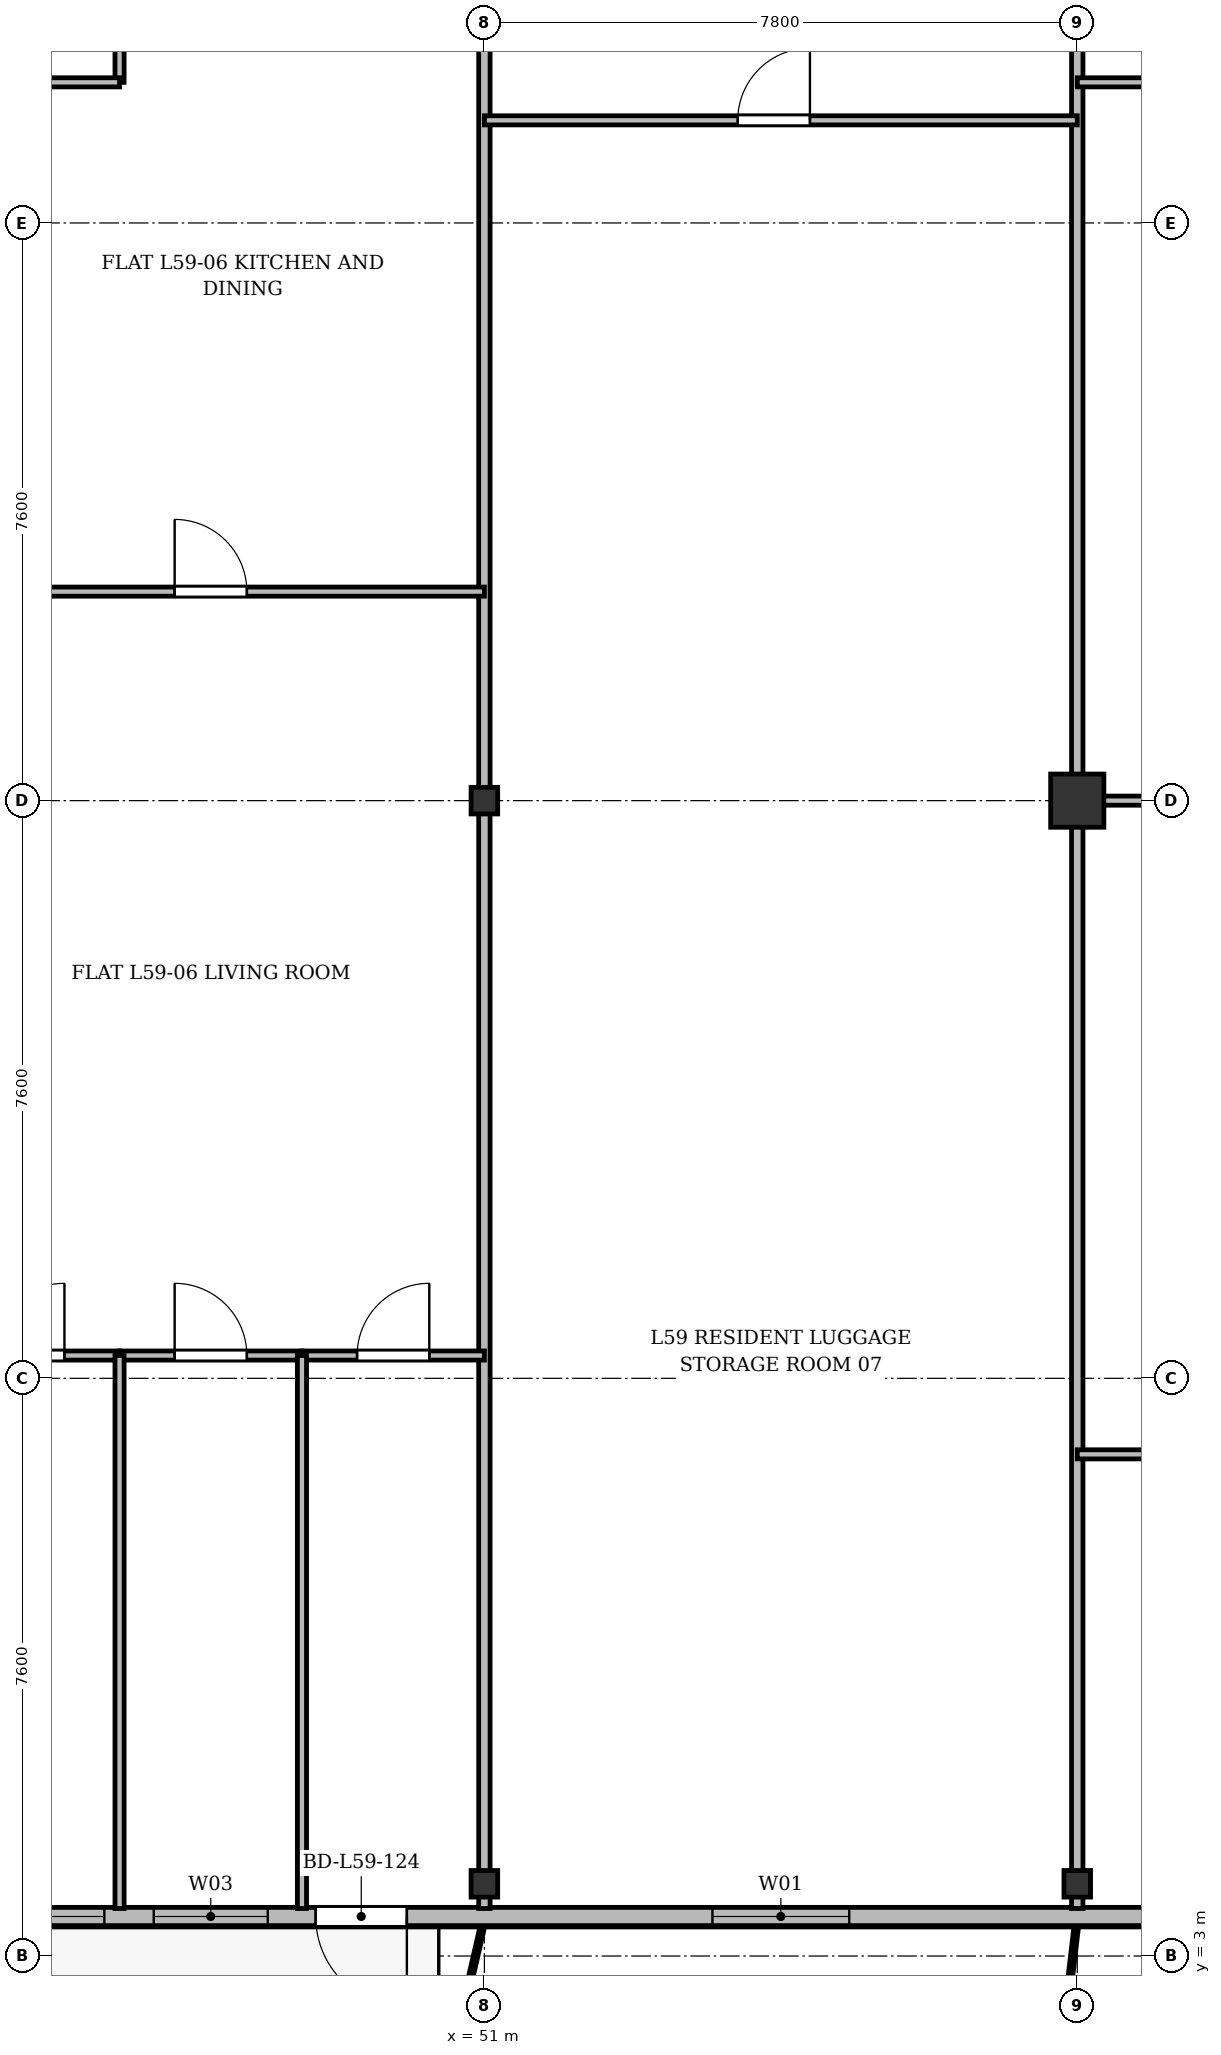
"""IFC4 building model, lengths in metres.
Left out: names, types, materials, properties, quantities, classifications, styles, units other than length and angle.
Written with IfcOpenShell. Run it as: python <this file> out.ifc"""

import sys

from ifc_helpers import new_model, si_unit, direction, frame, frame_2d, origin, origin_2d, place, context, subcontext, project, spatial, rectangle, i_section, extrude, source, transform, mapped, element, fill, save


model = new_model("IFC4")
c1 = context("Model", 3, precision=1e-05, world=origin(), true_north=direction((0.0, 1.0)))
c2 = subcontext(c1, "Body", "Model", "MODEL_VIEW")
j1 = project(units=[si_unit("LENGTHUNIT", "METRE"), si_unit("PLANEANGLEUNIT", "RADIAN")], contexts=[c1])
p1 = place(None, origin())
s1 = spatial("IfcSite", under=j1, at=p1, CompositionType="ELEMENT")
p2 = place(p1, origin())
s2 = spatial("IfcBuilding", under=s1, at=p2, CompositionType="ELEMENT")
p3 = place(p2, frame((0.0, 0.0, 226.5)))
s3 = spatial("IfcBuildingStorey", under=s2, at=p3, CompositionType="ELEMENT", Elevation=226.5)
m1 = source(origin(), c2, "Body", "SweptSolid", [
    extrude(i_section(OverallWidth=0.35, OverallDepth=0.35, WebThickness=0.018, FlangeThickness=0.028, at=origin_2d()), origin(), (0.0, 0.0, 1.0), 3.6),
])
for number, where, z_axis, x_axis in (
    (1, (51.0, 3.95, 0.0), (0.0, 0.0, 1.0), (1.0, 0.0, 0.0)),
    (2, (51.0, 18.2, 0.0), (0.0, 0.0, 1.0), (1.0, 0.0, 0.0)),
    (3, (58.8, 3.95, 0.0), (0.0, 0.0, 1.0), (1.0, 0.0, 0.0)),
):
    element("IfcColumn", number, at=place(p3, frame(where, z_axis=z_axis, x_axis=x_axis)), inside=s3, PredefinedType="COLUMN", context=c2, shape_type="MappedRepresentation", body=[
        mapped(m1, transform((0.0, 0.0, 0.0), x_axis=(1.0, 0.0, 0.0), y_axis=(0.0, 1.0, 0.0), z_axis=(0.0, 0.0, 1.0), scale=1.0)),
    ])
m2 = source(origin(), c2, "Body", "SweptSolid", [
    extrude(rectangle(XDim=0.7, YDim=0.7, at=origin_2d()), origin(), (0.0, 0.0, 1.0), 3.6),
])
p4 = place(p3, frame((58.8, 18.2, 0.0), z_axis=(0.0, 0.0, 1.0), x_axis=(1.0, 0.0, 0.0)))
e4 = element("IfcColumn", 4, at=p4, inside=s3, PredefinedType="COLUMN", context=c2, shape_type="MappedRepresentation", body=[
    mapped(m2, transform((0.0, 0.0, 0.0), x_axis=(1.0, 0.0, 0.0), y_axis=(0.0, 1.0, 0.0), z_axis=(0.0, 0.0, 1.0), scale=1.0)),
])
p5 = place(p3, frame((63.4, 3.52, 0.0), z_axis=(0.0, 0.0, 1.0), x_axis=(-1.0, 0.0, 0.0)))
e5 = element("IfcWall", 5, at=p5, inside=s3, PredefinedType="SOLIDWALL", context=c2, shape_type="SweptSolid", body=[
    extrude(rectangle(XDim=52.4, YDim=0.24, at=frame_2d((26.2, 0.0))), origin(), (0.0, 0.0, 1.0), 3.36),
])
p6 = place(p5, frame((1.52, 0.0, 0.9)))
e6 = element("IfcOpeningElement", 6, at=p6, cuts=e5, PredefinedType="OPENING", context=c2, shape_type="SweptSolid", body=[
    extrude(rectangle(XDim=1.65, YDim=1.85, at=frame_2d((0.825, 0.925))), frame((0.0, 0.13, 0.0), z_axis=(0.0, -1.0, 0.0), x_axis=(1.0, 0.0, 0.0)), (0.0, 0.0, 1.0), 0.26),
])
p7 = place(p5, frame((7.6, 0.0, 0.9)))
e7 = element("IfcOpeningElement", 7, at=p7, cuts=e5, PredefinedType="OPENING", context=c2, shape_type="SweptSolid", body=[
    extrude(rectangle(XDim=1.8, YDim=1.8, at=frame_2d((0.9, 0.9))), frame((0.0, 0.13, 0.0), z_axis=(0.0, -1.0, 0.0), x_axis=(1.0, 0.0, 0.0)), (0.0, 0.0, 1.0), 0.26),
])
p8 = place(p5, frame((13.42, 0.0, 0.0)))
e8 = element("IfcOpeningElement", 8, at=p8, cuts=e5, PredefinedType="OPENING", context=c2, shape_type="SweptSolid", body=[
    extrude(rectangle(XDim=1.2, YDim=2.2, at=frame_2d((0.6, 1.1))), frame((0.0, 0.13, 0.0), z_axis=(0.0, -1.0, 0.0), x_axis=(1.0, 0.0, 0.0)), (0.0, 0.0, 1.0), 0.26),
])
p9 = place(p5, frame((15.25, 0.0, 0.9)))
e9 = element("IfcOpeningElement", 9, at=p9, cuts=e5, PredefinedType="OPENING", context=c2, shape_type="SweptSolid", body=[
    extrude(rectangle(XDim=1.5, YDim=1.75, at=frame_2d((0.75, 0.875))), frame((0.0, 0.13, 0.0), z_axis=(0.0, -1.0, 0.0), x_axis=(1.0, 0.0, 0.0)), (0.0, 0.0, 1.0), 0.26),
])
p10 = place(p5, frame((17.4, 0.0, 0.9)))
e10 = element("IfcOpeningElement", 10, at=p10, cuts=e5, PredefinedType="OPENING", context=c2, shape_type="SweptSolid", body=[
    extrude(rectangle(XDim=2.0, YDim=1.95, at=frame_2d((1.0, 0.975))), frame((0.0, 0.13, 0.0), z_axis=(0.0, -1.0, 0.0), x_axis=(1.0, 0.0, 0.0)), (0.0, 0.0, 1.0), 0.26),
])
p11 = place(p5, frame((20.425, 0.0, 0.9)))
e11 = element("IfcOpeningElement", 11, at=p11, cuts=e5, PredefinedType="OPENING", context=c2, shape_type="SweptSolid", body=[
    extrude(rectangle(XDim=1.65, YDim=1.85, at=frame_2d((0.825, 0.925))), frame((0.0, 0.13, 0.0), z_axis=(0.0, -1.0, 0.0), x_axis=(1.0, 0.0, 0.0)), (0.0, 0.0, 1.0), 0.26),
])
p12 = place(p5, frame((23.65, 0.0, 0.9)))
e12 = element("IfcOpeningElement", 12, at=p12, cuts=e5, PredefinedType="OPENING", context=c2, shape_type="SweptSolid", body=[
    extrude(rectangle(XDim=1.8, YDim=1.8, at=frame_2d((0.9, 0.9))), frame((0.0, 0.13, 0.0), z_axis=(0.0, -1.0, 0.0), x_axis=(1.0, 0.0, 0.0)), (0.0, 0.0, 1.0), 0.26),
])
p13 = place(p5, frame((28.4, 0.0, 0.9)))
e13 = element("IfcOpeningElement", 13, at=p13, cuts=e5, PredefinedType="OPENING", context=c2, shape_type="SweptSolid", body=[
    extrude(rectangle(XDim=2.2, YDim=1.8, at=frame_2d((1.1, 0.9))), frame((0.0, 0.13, 0.0), z_axis=(0.0, -1.0, 0.0), x_axis=(1.0, 0.0, 0.0)), (0.0, 0.0, 1.0), 0.26),
])
p14 = place(p5, frame((33.85, 0.0, 0.9)))
e14 = element("IfcOpeningElement", 14, at=p14, cuts=e5, PredefinedType="OPENING", context=c2, shape_type="SweptSolid", body=[
    extrude(rectangle(XDim=1.5, YDim=1.75, at=frame_2d((0.75, 0.875))), frame((0.0, 0.13, 0.0), z_axis=(0.0, -1.0, 0.0), x_axis=(1.0, 0.0, 0.0)), (0.0, 0.0, 1.0), 0.26),
])
p15 = place(p5, frame((37.2, 0.0, 0.9)))
e15 = element("IfcOpeningElement", 15, at=p15, cuts=e5, PredefinedType="OPENING", context=c2, shape_type="SweptSolid", body=[
    extrude(rectangle(XDim=2.0, YDim=1.95, at=frame_2d((1.0, 0.975))), frame((0.0, 0.13, 0.0), z_axis=(0.0, -1.0, 0.0), x_axis=(1.0, 0.0, 0.0)), (0.0, 0.0, 1.0), 0.26),
])
p16 = place(p5, frame((41.09, 0.0, 0.0)))
e16 = element("IfcOpeningElement", 16, at=p16, cuts=e5, PredefinedType="OPENING", context=c2, shape_type="SweptSolid", body=[
    extrude(rectangle(XDim=1.2, YDim=2.2, at=frame_2d((0.6, 1.1))), frame((0.0, 0.13, 0.0), z_axis=(0.0, -1.0, 0.0), x_axis=(1.0, 0.0, 0.0)), (0.0, 0.0, 1.0), 0.26),
])
p17 = place(p5, frame((43.0, 0.0, 0.9)))
e17 = element("IfcOpeningElement", 17, at=p17, cuts=e5, PredefinedType="OPENING", context=c2, shape_type="SweptSolid", body=[
    extrude(rectangle(XDim=1.8, YDim=1.8, at=frame_2d((0.9, 0.9))), frame((0.0, 0.13, 0.0), z_axis=(0.0, -1.0, 0.0), x_axis=(1.0, 0.0, 0.0)), (0.0, 0.0, 1.0), 0.26),
])
p18 = place(p5, frame((45.75, 0.0, 0.9)))
e18 = element("IfcOpeningElement", 18, at=p18, cuts=e5, PredefinedType="OPENING", context=c2, shape_type="SweptSolid", body=[
    extrude(rectangle(XDim=1.5, YDim=1.75, at=frame_2d((0.75, 0.875))), frame((0.0, 0.13, 0.0), z_axis=(0.0, -1.0, 0.0), x_axis=(1.0, 0.0, 0.0)), (0.0, 0.0, 1.0), 0.26),
])
p19 = place(p5, frame((49.305, 0.0, 0.9)))
e19 = element("IfcOpeningElement", 19, at=p19, cuts=e5, PredefinedType="OPENING", context=c2, shape_type="SweptSolid", body=[
    extrude(rectangle(XDim=1.5, YDim=1.75, at=frame_2d((0.75, 0.875))), frame((0.0, 0.13, 0.0), z_axis=(0.0, -1.0, 0.0), x_axis=(1.0, 0.0, 0.0)), (0.0, 0.0, 1.0), 0.26),
])
for number, where, z_axis, x_axis in (
    (20, (51.0, 3.625, 0.0), (0.0, 0.0, 1.0), (0.0, 1.0, 0.0)),
    (21, (58.8, 3.625, 0.0), (0.0, 0.0, 1.0), (0.0, 1.0, 0.0)),
):
    element("IfcWall", number, at=place(p3, frame(where, z_axis=z_axis, x_axis=x_axis)), inside=s3, PredefinedType="PARTITIONING", context=c2, shape_type="SweptSolid", body=[
        extrude(rectangle(XDim=27.375, YDim=0.15, at=frame_2d((13.688, 0.0))), origin(), (0.0, 0.0, 1.0), 2.86),
    ])
p20 = place(p3, frame((43.8, 20.95, 0.0), z_axis=(0.0, 0.0, 1.0), x_axis=(1.0, 0.0, 0.0)))
e22 = element("IfcWall", 22, at=p20, inside=s3, PredefinedType="PARTITIONING", context=c2, shape_type="SweptSolid", body=[
    extrude(rectangle(XDim=7.2, YDim=0.12, at=frame_2d((3.6, 0.0))), origin(), (0.0, 0.0, 1.0), 2.86),
])
p21 = place(p20, frame((3.125, 0.0, 0.0)))
e23 = element("IfcOpeningElement", 23, at=p21, cuts=e22, PredefinedType="OPENING", context=c2, shape_type="SweptSolid", body=[
    extrude(rectangle(XDim=0.95, YDim=2.15, at=frame_2d((0.475, 1.075))), frame((0.0, 0.07, 0.0), z_axis=(0.0, -1.0, 0.0), x_axis=(1.0, 0.0, 0.0)), (0.0, 0.0, 1.0), 0.14),
])
p22 = place(p3, frame((46.2, 27.65, 0.0), z_axis=(0.0, 0.0, 1.0), x_axis=(0.0, 1.0, 0.0)))
e24 = element("IfcWall", 24, at=p22, inside=s3, PredefinedType="PARTITIONING", context=c2, shape_type="SweptSolid", body=[
    extrude(rectangle(XDim=3.35, YDim=0.12, at=frame_2d((1.675, 0.0))), origin(), (0.0, 0.0, 1.0), 3.36),
])
p23 = place(p22, frame((0.8, 0.0, 0.0)))
e25 = element("IfcOpeningElement", 25, at=p23, cuts=e24, PredefinedType="OPENING", context=c2, shape_type="SweptSolid", body=[
    extrude(rectangle(XDim=0.85, YDim=2.1, at=frame_2d((0.425, 1.05))), frame((0.0, 0.07, 0.0), z_axis=(0.0, -1.0, 0.0), x_axis=(1.0, 0.0, 0.0)), (0.0, 0.0, 1.0), 0.14),
])
p24 = place(p3, frame((43.8, 27.65, 0.0), z_axis=(0.0, 0.0, 1.0), x_axis=(1.0, 0.0, 0.0)))
e26 = element("IfcWall", 26, at=p24, inside=s3, PredefinedType="PARTITIONING", context=c2, shape_type="SweptSolid", body=[
    extrude(rectangle(XDim=2.4, YDim=0.12, at=frame_2d((1.2, 0.0))), origin(), (0.0, 0.0, 1.0), 2.86),
])
p25 = place(p3, frame((43.8, 10.9, 0.0), z_axis=(0.0, 0.0, 1.0), x_axis=(1.0, 0.0, 0.0)))
e27 = element("IfcWall", 27, at=p25, inside=s3, PredefinedType="PARTITIONING", context=c2, shape_type="SweptSolid", body=[
    extrude(rectangle(XDim=2.4, YDim=0.12, at=frame_2d((1.2, 0.0))), origin(), (0.0, 0.0, 1.0), 2.86),
])
p26 = place(p25, frame((0.725, 0.0, 0.0)))
e28 = element("IfcOpeningElement", 28, at=p26, cuts=e27, PredefinedType="OPENING", context=c2, shape_type="SweptSolid", body=[
    extrude(rectangle(XDim=0.95, YDim=2.15, at=frame_2d((0.475, 1.075))), frame((0.0, 0.07, 0.0), z_axis=(0.0, -1.0, 0.0), x_axis=(1.0, 0.0, 0.0)), (0.0, 0.0, 1.0), 0.14),
])
p27 = place(p3, frame((46.2, 10.9, 0.0), z_axis=(0.0, 0.0, 1.0), x_axis=(1.0, 0.0, 0.0)))
e29 = element("IfcWall", 29, at=p27, inside=s3, PredefinedType="PARTITIONING", context=c2, shape_type="SweptSolid", body=[
    extrude(rectangle(XDim=2.4, YDim=0.12, at=frame_2d((1.2, 0.0))), origin(), (0.0, 0.0, 1.0), 3.06),
])
p28 = place(p27, frame((0.725, 0.0, 0.0)))
e30 = element("IfcOpeningElement", 30, at=p28, cuts=e29, PredefinedType="OPENING", context=c2, shape_type="SweptSolid", body=[
    extrude(rectangle(XDim=0.95, YDim=2.15, at=frame_2d((0.475, 1.075))), frame((0.0, 0.07, 0.0), z_axis=(0.0, -1.0, 0.0), x_axis=(1.0, 0.0, 0.0)), (0.0, 0.0, 1.0), 0.14),
])
p29 = place(p3, frame((46.2, 3.625, 0.0), z_axis=(0.0, 0.0, 1.0), x_axis=(0.0, 1.0, 0.0)))
e31 = element("IfcWall", 31, at=p29, inside=s3, PredefinedType="PARTITIONING", context=c2, shape_type="SweptSolid", body=[
    extrude(rectangle(XDim=7.275, YDim=0.12, at=frame_2d((3.637, 0.0))), origin(), (0.0, 0.0, 1.0), 2.91),
])
p30 = place(p3, frame((48.6, 10.9, 0.0), z_axis=(0.0, 0.0, 1.0), x_axis=(1.0, 0.0, 0.0)))
e32 = element("IfcWall", 32, at=p30, inside=s3, PredefinedType="PARTITIONING", context=c2, shape_type="SweptSolid", body=[
    extrude(rectangle(XDim=2.4, YDim=0.12, at=frame_2d((1.2, 0.0))), origin(), (0.0, 0.0, 1.0), 2.86),
])
p31 = place(p30, frame((0.725, 0.0, 0.0)))
e33 = element("IfcOpeningElement", 33, at=p31, cuts=e32, PredefinedType="OPENING", context=c2, shape_type="SweptSolid", body=[
    extrude(rectangle(XDim=0.95, YDim=2.15, at=frame_2d((0.475, 1.075))), frame((0.0, 0.07, 0.0), z_axis=(0.0, -1.0, 0.0), x_axis=(1.0, 0.0, 0.0)), (0.0, 0.0, 1.0), 0.14),
])
p32 = place(p3, frame((48.6, 3.625, 0.0), z_axis=(0.0, 0.0, 1.0), x_axis=(0.0, 1.0, 0.0)))
e34 = element("IfcWall", 34, at=p32, inside=s3, PredefinedType="PARTITIONING", context=c2, shape_type="SweptSolid", body=[
    extrude(rectangle(XDim=7.275, YDim=0.12, at=frame_2d((3.637, 0.0))), origin(), (0.0, 0.0, 1.0), 2.91),
])
p33 = place(p3, frame((51.0, 27.15, 0.0), z_axis=(0.0, 0.0, 1.0), x_axis=(1.0, 0.0, 0.0)))
e35 = element("IfcWall", 35, at=p33, inside=s3, PredefinedType="PARTITIONING", context=c2, shape_type="SweptSolid", body=[
    extrude(rectangle(XDim=7.8, YDim=0.12, at=frame_2d((3.9, 0.0))), origin(), (0.0, 0.0, 1.0), 2.86),
])
p34 = place(p33, frame((3.333, 0.0, 0.0)))
e36 = element("IfcOpeningElement", 36, at=p34, cuts=e35, PredefinedType="OPENING", context=c2, shape_type="SweptSolid", body=[
    extrude(rectangle(XDim=0.95, YDim=2.15, at=frame_2d((0.475, 1.075))), frame((0.0, 0.07, 0.0), z_axis=(0.0, -1.0, 0.0), x_axis=(1.0, 0.0, 0.0)), (0.0, 0.0, 1.0), 0.14),
])
p35 = place(p3, frame((58.8, 18.2, 0.0), z_axis=(0.0, 0.0, 1.0), x_axis=(1.0, 0.0, 0.0)))
e37 = element("IfcWall", 37, at=p35, inside=s3, PredefinedType="PARTITIONING", context=c2, shape_type="SweptSolid", body=[
    extrude(rectangle(XDim=7.36, YDim=0.12, at=frame_2d((3.68, 0.0))), origin(), (0.0, 0.0, 1.0), 2.91),
])
p36 = place(p35, frame((3.114, 0.0, 0.0)))
e38 = element("IfcOpeningElement", 38, at=p36, cuts=e37, PredefinedType="OPENING", context=c2, shape_type="SweptSolid", body=[
    extrude(rectangle(XDim=0.95, YDim=2.15, at=frame_2d((0.475, 1.075))), frame((0.0, 0.07, 0.0), z_axis=(0.0, -1.0, 0.0), x_axis=(1.0, 0.0, 0.0)), (0.0, 0.0, 1.0), 0.14),
])
p37 = place(p3, frame((58.8, 27.65, 0.0), z_axis=(0.0, 0.0, 1.0), x_axis=(1.0, 0.0, 0.0)))
e39 = element("IfcWall", 39, at=p37, inside=s3, PredefinedType="PARTITIONING", context=c2, shape_type="SweptSolid", body=[
    extrude(rectangle(XDim=2.4, YDim=0.12, at=frame_2d((1.2, 0.0))), origin(), (0.0, 0.0, 1.0), 2.86),
])
p38 = place(p3, frame((58.8, 9.6, 0.0), z_axis=(0.0, 0.0, 1.0), x_axis=(1.0, 0.0, 0.0)))
e40 = element("IfcWall", 40, at=p38, inside=s3, PredefinedType="PARTITIONING", context=c2, shape_type="SweptSolid", body=[
    extrude(rectangle(XDim=7.36, YDim=0.12, at=frame_2d((3.68, 0.0))), origin(), (0.0, 0.0, 1.0), 2.86),
])
p39 = place(p38, frame((3.114, 0.0, 0.0)))
e41 = element("IfcOpeningElement", 41, at=p39, cuts=e40, PredefinedType="OPENING", context=c2, shape_type="SweptSolid", body=[
    extrude(rectangle(XDim=0.95, YDim=2.15, at=frame_2d((0.475, 1.075))), frame((0.0, 0.07, 0.0), z_axis=(0.0, -1.0, 0.0), x_axis=(1.0, 0.0, 0.0)), (0.0, 0.0, 1.0), 0.14),
])
m3 = source(origin(), c2, "Body", "SweptSolid", [
    extrude(rectangle(XDim=1.8, YDim=1.8, at=frame_2d((0.9, 0.9))), frame((0.0, 0.03, 0.0), z_axis=(0.0, -1.0, 0.0), x_axis=(1.0, 0.0, 0.0)), (0.0, 0.0, 1.0), 0.06),
])
p40 = place(p7, origin())
e42 = element("IfcWindow", 42, at=p40, inside=s3, PartitioningType="SINGLE_PANEL", PredefinedType="WINDOW", context=c2, shape_type="MappedRepresentation", body=[
    mapped(m3, transform((0.0, 0.0, 0.0), x_axis=(1.0, 0.0, 0.0), y_axis=(0.0, 1.0, 0.0), z_axis=(0.0, 0.0, 1.0), scale=1.0)),
])
fill(e7, e42)
m4 = source(origin(), c2, "Body", "SweptSolid", [
    extrude(rectangle(XDim=1.2, YDim=2.2, at=frame_2d((0.6, 1.1))), frame((0.0, 0.025, 0.0), z_axis=(0.0, -1.0, 0.0), x_axis=(1.0, 0.0, 0.0)), (0.0, 0.0, 1.0), 0.05),
])
p41 = place(p8, origin())
e43 = element("IfcDoor", 43, at=p41, inside=s3, OperationType="SINGLE_SWING_LEFT", PredefinedType="DOOR", context=c2, shape_type="MappedRepresentation", body=[
    mapped(m4, transform((0.0, 0.0, 0.0), x_axis=(1.0, 0.0, 0.0), y_axis=(0.0, 1.0, 0.0), z_axis=(0.0, 0.0, 1.0), scale=1.0)),
])
fill(e8, e43)
m5 = source(origin(), c2, "Body", "SweptSolid", [
    extrude(rectangle(XDim=1.5, YDim=1.75, at=frame_2d((0.75, 0.875))), frame((0.0, 0.03, 0.0), z_axis=(0.0, -1.0, 0.0), x_axis=(1.0, 0.0, 0.0)), (0.0, 0.0, 1.0), 0.06),
])
p42 = place(p9, origin())
e44 = element("IfcWindow", 44, at=p42, inside=s3, PartitioningType="SINGLE_PANEL", PredefinedType="WINDOW", context=c2, shape_type="MappedRepresentation", body=[
    mapped(m5, transform((0.0, 0.0, 0.0), x_axis=(1.0, 0.0, 0.0), y_axis=(0.0, 1.0, 0.0), z_axis=(0.0, 0.0, 1.0), scale=1.0)),
])
fill(e9, e44)
m6 = source(origin(), c2, "Body", "SweptSolid", [
    extrude(rectangle(XDim=2.0, YDim=1.95, at=frame_2d((1.0, 0.975))), frame((0.0, 0.03, 0.0), z_axis=(0.0, -1.0, 0.0), x_axis=(1.0, 0.0, 0.0)), (0.0, 0.0, 1.0), 0.06),
])
p43 = place(p10, origin())
e45 = element("IfcWindow", 45, at=p43, inside=s3, PartitioningType="SINGLE_PANEL", PredefinedType="WINDOW", context=c2, shape_type="MappedRepresentation", body=[
    mapped(m6, transform((0.0, 0.0, 0.0), x_axis=(1.0, 0.0, 0.0), y_axis=(0.0, 1.0, 0.0), z_axis=(0.0, 0.0, 1.0), scale=1.0)),
])
fill(e10, e45)
m7 = source(origin(), c2, "Body", "SweptSolid", [
    extrude(rectangle(XDim=0.95, YDim=2.15, at=frame_2d((0.475, 1.075))), frame((0.0, 0.025, 0.0), z_axis=(0.0, -1.0, 0.0), x_axis=(1.0, 0.0, 0.0)), (0.0, 0.0, 1.0), 0.05),
])
p44 = place(p21, origin())
e46 = element("IfcDoor", 46, at=p44, inside=s3, OperationType="SINGLE_SWING_LEFT", PredefinedType="DOOR", context=c2, shape_type="MappedRepresentation", body=[
    mapped(m7, transform((0.0, 0.0, 0.0), x_axis=(1.0, 0.0, 0.0), y_axis=(0.0, 1.0, 0.0), z_axis=(0.0, 0.0, 1.0), scale=1.0)),
])
fill(e23, e46)
p45 = place(p26, origin())
e47 = element("IfcDoor", 47, at=p45, inside=s3, OperationType="SINGLE_SWING_RIGHT", PredefinedType="DOOR", context=c2, shape_type="MappedRepresentation", body=[
    mapped(m7, transform((0.0, 0.0, 0.0), x_axis=(1.0, 0.0, 0.0), y_axis=(0.0, 1.0, 0.0), z_axis=(0.0, 0.0, 1.0), scale=1.0)),
])
fill(e28, e47)
p46 = place(p28, origin())
e48 = element("IfcDoor", 48, at=p46, inside=s3, OperationType="SINGLE_SWING_LEFT", PredefinedType="DOOR", context=c2, shape_type="MappedRepresentation", body=[
    mapped(m7, transform((0.0, 0.0, 0.0), x_axis=(1.0, 0.0, 0.0), y_axis=(0.0, 1.0, 0.0), z_axis=(0.0, 0.0, 1.0), scale=1.0)),
])
fill(e30, e48)
p47 = place(p31, origin())
e49 = element("IfcDoor", 49, at=p47, inside=s3, OperationType="SINGLE_SWING_RIGHT", PredefinedType="DOOR", context=c2, shape_type="MappedRepresentation", body=[
    mapped(m7, transform((0.0, 0.0, 0.0), x_axis=(1.0, 0.0, 0.0), y_axis=(0.0, 1.0, 0.0), z_axis=(0.0, 0.0, 1.0), scale=1.0)),
])
fill(e33, e49)
p48 = place(p34, origin())
e50 = element("IfcDoor", 50, at=p48, inside=s3, OperationType="SINGLE_SWING_RIGHT", PredefinedType="DOOR", context=c2, shape_type="MappedRepresentation", body=[
    mapped(m7, transform((0.0, 0.0, 0.0), x_axis=(1.0, 0.0, 0.0), y_axis=(0.0, 1.0, 0.0), z_axis=(0.0, 0.0, 1.0), scale=1.0)),
])
fill(e36, e50)
save(model, sys.argv[1])
